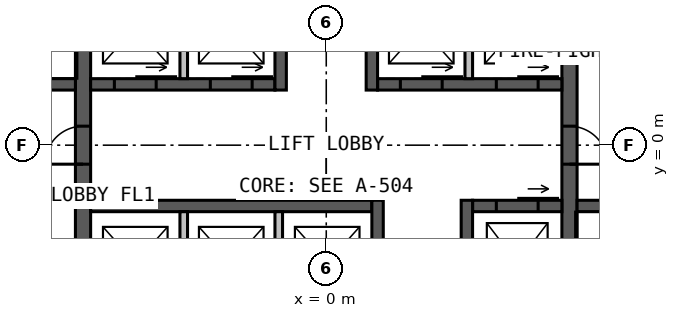
"""IFC4 building model, lengths in metres.
Left out: names, types, materials, properties, quantities, classifications, styles, units other than length and angle.
Written with IfcOpenShell. Run it as: python <this file> out.ifc"""

import sys

from ifc_helpers import new_model, si_unit, direction, frame, frame_2d, origin, place, context, subcontext, project, spatial, rectangle, extrude, element, fill, save


model = new_model("IFC4")
c1 = context("Model", 3, precision=1e-05, world=origin(), true_north=direction((0.0, 1.0)))
c2 = subcontext(c1, "Body", "Model", "MODEL_VIEW")
j1 = project(units=[si_unit("LENGTHUNIT", "METRE"), si_unit("PLANEANGLEUNIT", "RADIAN")], contexts=[c1])
p1 = place(None, origin())
s1 = spatial("IfcSite", under=j1, at=p1, CompositionType="ELEMENT")
p2 = place(p1, origin())
s2 = spatial("IfcBuilding", under=s1, at=p2, CompositionType="ELEMENT")
p3 = place(p2, frame((0.0, 0.0, 146.0)))
s3 = spatial("IfcBuildingStorey", under=s2, at=p3, CompositionType="ELEMENT", Elevation=146.0)
p4 = place(p3, frame((-6.4, -9.45, 0.0), z_axis=(0.0, 0.0, 1.0), x_axis=(0.0, 1.0, 0.0)))
e1 = element("IfcWall", 1, at=p4, inside=s3, PredefinedType="SOLIDWALL", context=c2, shape_type="SweptSolid", body=[
    extrude(rectangle(XDim=18.9, YDim=0.4, at=frame_2d((9.45, 0.0))), origin(), (0.0, 0.0, 1.0), 4.0),
])
p5 = place(p4, frame((8.95, 0.0, 0.0)))
e2 = element("IfcOpeningElement", 2, at=p5, cuts=e1, PredefinedType="OPENING", context=c2, shape_type="SweptSolid", body=[
    extrude(rectangle(XDim=1.0, YDim=2.2, at=frame_2d((0.5, 1.1))), frame((0.0, 0.21, 0.0), z_axis=(0.0, -1.0, 0.0), x_axis=(1.0, 0.0, 0.0)), (0.0, 0.0, 1.0), 0.42),
])
p6 = place(p3, frame((6.4, 9.45, 0.0), z_axis=(0.0, 0.0, 1.0), x_axis=(0.0, -1.0, 0.0)))
e3 = element("IfcWall", 3, at=p6, inside=s3, PredefinedType="SOLIDWALL", context=c2, shape_type="SweptSolid", body=[
    extrude(rectangle(XDim=18.9, YDim=0.4, at=frame_2d((9.45, 0.0))), origin(), (0.0, 0.0, 1.0), 4.0),
])
p7 = place(p6, frame((8.95, 0.0, 0.0)))
e4 = element("IfcOpeningElement", 4, at=p7, cuts=e3, PredefinedType="OPENING", context=c2, shape_type="SweptSolid", body=[
    extrude(rectangle(XDim=1.0, YDim=2.2, at=frame_2d((0.5, 1.1))), frame((0.0, 0.21, 0.0), z_axis=(0.0, -1.0, 0.0), x_axis=(1.0, 0.0, 0.0)), (0.0, 0.0, 1.0), 0.42),
])
p8 = place(p3, frame((-6.2, 1.6, 0.0), z_axis=(0.0, 0.0, 1.0), x_axis=(1.0, 0.0, 0.0)))
e5 = element("IfcWall", 5, at=p8, inside=s3, PredefinedType="SOLIDWALL", context=c2, shape_type="SweptSolid", body=[
    extrude(rectangle(XDim=4.85, YDim=0.3, at=frame_2d((2.425, 0.0))), origin(), (0.0, 0.0, 1.0), 4.0),
])
p9 = place(p8, frame((0.625, 0.0, 0.0)))
e6 = element("IfcOpeningElement", 6, at=p9, cuts=e5, PredefinedType="OPENING", context=c2, shape_type="SweptSolid", body=[
    extrude(rectangle(XDim=1.1, YDim=2.2, at=frame_2d((0.55, 1.1))), frame((0.0, 0.16, 0.0), z_axis=(0.0, -1.0, 0.0), x_axis=(1.0, 0.0, 0.0)), (0.0, 0.0, 1.0), 0.32),
])
p10 = place(p8, frame((3.15, 0.0, 0.0)))
e7 = element("IfcOpeningElement", 7, at=p10, cuts=e5, PredefinedType="OPENING", context=c2, shape_type="SweptSolid", body=[
    extrude(rectangle(XDim=1.1, YDim=2.2, at=frame_2d((0.55, 1.1))), frame((0.0, 0.16, 0.0), z_axis=(0.0, -1.0, 0.0), x_axis=(1.0, 0.0, 0.0)), (0.0, 0.0, 1.0), 0.32),
])
p11 = place(p3, frame((1.35, 1.6, 0.0), z_axis=(0.0, 0.0, 1.0), x_axis=(1.0, 0.0, 0.0)))
e8 = element("IfcWall", 8, at=p11, inside=s3, PredefinedType="SOLIDWALL", context=c2, shape_type="SweptSolid", body=[
    extrude(rectangle(XDim=4.85, YDim=0.3, at=frame_2d((2.425, 0.0))), origin(), (0.0, 0.0, 1.0), 4.0),
])
p12 = place(p11, frame((0.6, 0.0, 0.0)))
e9 = element("IfcOpeningElement", 9, at=p12, cuts=e8, PredefinedType="OPENING", context=c2, shape_type="SweptSolid", body=[
    extrude(rectangle(XDim=1.1, YDim=2.2, at=frame_2d((0.55, 1.1))), frame((0.0, 0.16, 0.0), z_axis=(0.0, -1.0, 0.0), x_axis=(1.0, 0.0, 0.0)), (0.0, 0.0, 1.0), 0.32),
])
p13 = place(p11, frame((3.125, 0.0, 0.0)))
e10 = element("IfcOpeningElement", 10, at=p13, cuts=e8, PredefinedType="OPENING", context=c2, shape_type="SweptSolid", body=[
    extrude(rectangle(XDim=1.1, YDim=2.2, at=frame_2d((0.55, 1.1))), frame((0.0, 0.16, 0.0), z_axis=(0.0, -1.0, 0.0), x_axis=(1.0, 0.0, 0.0)), (0.0, 0.0, 1.0), 0.32),
])
p14 = place(p3, frame((-1.2, 1.45, 0.0), z_axis=(0.0, 0.0, 1.0), x_axis=(0.0, 1.0, 0.0)))
e11 = element("IfcWall", 11, at=p14, inside=s3, PredefinedType="SOLIDWALL", context=c2, shape_type="SweptSolid", body=[
    extrude(rectangle(XDim=8.0, YDim=0.3, at=frame_2d((4.0, 0.0))), origin(), (0.0, 0.0, 1.0), 4.0),
])
p15 = place(p14, frame((5.05, 0.0, 0.0)))
e12 = element("IfcOpeningElement", 12, at=p15, cuts=e11, PredefinedType="OPENING", context=c2, shape_type="SweptSolid", body=[
    extrude(rectangle(XDim=1.0, YDim=2.2, at=frame_2d((0.5, 1.1))), frame((0.0, 0.16, 0.0), z_axis=(0.0, -1.0, 0.0), x_axis=(1.0, 0.0, 0.0)), (0.0, 0.0, 1.0), 0.32),
])
p16 = place(p3, frame((1.2, 1.45, 0.0), z_axis=(0.0, 0.0, 1.0), x_axis=(0.0, 1.0, 0.0)))
e13 = element("IfcWall", 13, at=p16, inside=s3, PredefinedType="SOLIDWALL", context=c2, shape_type="SweptSolid", body=[
    extrude(rectangle(XDim=8.0, YDim=0.3, at=frame_2d((4.0, 0.0))), origin(), (0.0, 0.0, 1.0), 4.0),
])
p17 = place(p16, frame((3.8, 0.0, 0.0)))
e14 = element("IfcOpeningElement", 14, at=p17, cuts=e13, PredefinedType="OPENING", context=c2, shape_type="SweptSolid", body=[
    extrude(rectangle(XDim=1.0, YDim=2.2, at=frame_2d((0.5, 1.1))), frame((0.0, 0.16, 0.0), z_axis=(0.0, -1.0, 0.0), x_axis=(1.0, 0.0, 0.0)), (0.0, 0.0, 1.0), 0.32),
])
p18 = place(p16, frame((6.15, 0.0, 0.0)))
e15 = element("IfcOpeningElement", 15, at=p18, cuts=e13, PredefinedType="OPENING", context=c2, shape_type="SweptSolid", body=[
    extrude(rectangle(XDim=1.0, YDim=2.2, at=frame_2d((0.5, 1.1))), frame((0.0, 0.16, 0.0), z_axis=(0.0, -1.0, 0.0), x_axis=(1.0, 0.0, 0.0)), (0.0, 0.0, 1.0), 0.32),
])
p19 = place(p3, frame((-6.2, -1.6, 0.0), z_axis=(0.0, 0.0, 1.0), x_axis=(1.0, 0.0, 0.0)))
e16 = element("IfcWall", 16, at=p19, inside=s3, PredefinedType="SOLIDWALL", context=c2, shape_type="SweptSolid", body=[
    extrude(rectangle(XDim=7.4, YDim=0.3, at=frame_2d((3.7, 0.0))), origin(), (0.0, 0.0, 1.0), 4.0),
])
p20 = place(p3, frame((3.85, -1.6, 0.0), z_axis=(0.0, 0.0, 1.0), x_axis=(1.0, 0.0, 0.0)))
e17 = element("IfcWall", 17, at=p20, inside=s3, PredefinedType="SOLIDWALL", context=c2, shape_type="SweptSolid", body=[
    extrude(rectangle(XDim=2.35, YDim=0.3, at=frame_2d((1.175, 0.0))), origin(), (0.0, 0.0, 1.0), 4.0),
])
p21 = place(p20, frame((0.625, 0.0, 0.0)))
e18 = element("IfcOpeningElement", 18, at=p21, cuts=e17, PredefinedType="OPENING", context=c2, shape_type="SweptSolid", body=[
    extrude(rectangle(XDim=1.1, YDim=2.2, at=frame_2d((0.55, 1.1))), frame((0.0, 0.16, 0.0), z_axis=(0.0, -1.0, 0.0), x_axis=(1.0, 0.0, 0.0)), (0.0, 0.0, 1.0), 0.32),
])
p22 = place(p3, frame((1.35, -1.45, 0.0), z_axis=(0.0, 0.0, 1.0), x_axis=(0.0, -1.0, 0.0)))
e19 = element("IfcWall", 19, at=p22, inside=s3, PredefinedType="SOLIDWALL", context=c2, shape_type="SweptSolid", body=[
    extrude(rectangle(XDim=8.0, YDim=0.3, at=frame_2d((4.0, 0.0))), origin(), (0.0, 0.0, 1.0), 4.0),
])
p23 = place(p22, frame((5.925, 0.0, 0.0)))
e20 = element("IfcOpeningElement", 20, at=p23, cuts=e19, PredefinedType="OPENING", context=c2, shape_type="SweptSolid", body=[
    extrude(rectangle(XDim=1.0, YDim=2.2, at=frame_2d((0.5, 1.1))), frame((0.0, 0.16, 0.0), z_axis=(0.0, -1.0, 0.0), x_axis=(1.0, 0.0, 0.0)), (0.0, 0.0, 1.0), 0.32),
])
p24 = place(p22, frame((3.525, 0.0, 0.0)))
e21 = element("IfcOpeningElement", 21, at=p24, cuts=e19, PredefinedType="OPENING", context=c2, shape_type="SweptSolid", body=[
    extrude(rectangle(XDim=0.9, YDim=2.2, at=frame_2d((0.45, 1.1))), frame((0.0, 0.16, 0.0), z_axis=(0.0, -1.0, 0.0), x_axis=(1.0, 0.0, 0.0)), (0.0, 0.0, 1.0), 0.32),
])
p25 = place(p3, frame((3.7, -1.45, 0.0), z_axis=(0.0, 0.0, 1.0), x_axis=(0.0, -1.0, 0.0)))
e22 = element("IfcWall", 22, at=p25, inside=s3, PredefinedType="SOLIDWALL", context=c2, shape_type="SweptSolid", body=[
    extrude(rectangle(XDim=8.0, YDim=0.3, at=frame_2d((4.0, 0.0))), origin(), (0.0, 0.0, 1.0), 4.0),
])
p26 = place(p25, frame((5.1, 0.0, 0.0)))
e23 = element("IfcOpeningElement", 23, at=p26, cuts=e22, PredefinedType="OPENING", context=c2, shape_type="SweptSolid", body=[
    extrude(rectangle(XDim=0.9, YDim=2.2, at=frame_2d((0.45, 1.1))), frame((0.0, 0.16, 0.0), z_axis=(0.0, -1.0, 0.0), x_axis=(1.0, 0.0, 0.0)), (0.0, 0.0, 1.0), 0.32),
])
p27 = place(p3, frame((-9.45, 1.6, 0.0), z_axis=(0.0, 0.0, 1.0), x_axis=(1.0, 0.0, 0.0)))
e24 = element("IfcWall", 24, at=p27, inside=s3, PredefinedType="SOLIDWALL", context=c2, shape_type="SweptSolid", body=[
    extrude(rectangle(XDim=2.85, YDim=0.3, at=frame_2d((1.425, 0.0))), origin(), (0.0, 0.0, 1.0), 4.0),
])
p28 = place(p27, frame((0.925, 0.0, 0.0)))
e25 = element("IfcOpeningElement", 25, at=p28, cuts=e24, PredefinedType="OPENING", context=c2, shape_type="SweptSolid", body=[
    extrude(rectangle(XDim=1.0, YDim=2.2, at=frame_2d((0.5, 1.1))), frame((0.0, 0.16, 0.0), z_axis=(0.0, -1.0, 0.0), x_axis=(1.0, 0.0, 0.0)), (0.0, 0.0, 1.0), 0.32),
])
p29 = place(p3, frame((6.6, -1.6, 0.0), z_axis=(0.0, 0.0, 1.0), x_axis=(1.0, 0.0, 0.0)))
e26 = element("IfcWall", 26, at=p29, inside=s3, PredefinedType="SOLIDWALL", context=c2, shape_type="SweptSolid", body=[
    extrude(rectangle(XDim=2.85, YDim=0.3, at=frame_2d((1.425, 0.0))), origin(), (0.0, 0.0, 1.0), 4.0),
])
p30 = place(p29, frame((0.925, 0.0, 0.0)))
e27 = element("IfcOpeningElement", 27, at=p30, cuts=e26, PredefinedType="OPENING", context=c2, shape_type="SweptSolid", body=[
    extrude(rectangle(XDim=1.0, YDim=2.2, at=frame_2d((0.5, 1.1))), frame((0.0, 0.16, 0.0), z_axis=(0.0, -1.0, 0.0), x_axis=(1.0, 0.0, 0.0)), (0.0, 0.0, 1.0), 0.32),
])
for number, where, z_axis, x_axis in (
    (28, (-3.75, 1.75, 0.0), (0.0, 0.0, 1.0), (0.0, 1.0, 0.0)),
    (29, (3.75, 1.75, 0.0), (0.0, 0.0, 1.0), (0.0, 1.0, 0.0)),
    (30, (-3.75, -1.75, 0.0), (0.0, 0.0, 1.0), (0.0, -1.0, 0.0)),
    (31, (-1.25, -1.75, 0.0), (0.0, 0.0, 1.0), (0.0, -1.0, 0.0)),
):
    element("IfcWall", number, at=place(p3, frame(where, z_axis=z_axis, x_axis=x_axis)), inside=s3, PredefinedType="SOLIDWALL", context=c2, shape_type="SweptSolid", body=[
        extrude(rectangle(XDim=2.7, YDim=0.2, at=frame_2d((1.35, 0.0))), origin(), (0.0, 0.0, 1.0), 3.75),
    ])
p31 = place(p5, origin())
e32 = element("IfcDoor", 32, at=p31, inside=s3, OperationType="SINGLE_SWING_LEFT", PredefinedType="DOOR", context=c2, shape_type="SweptSolid", body=[
    extrude(rectangle(XDim=1.0, YDim=2.2, at=frame_2d((0.5, 1.1))), frame((0.0, 0.025, 0.0), z_axis=(0.0, -1.0, 0.0), x_axis=(1.0, 0.0, 0.0)), (0.0, 0.0, 1.0), 0.05),
])
fill(e2, e32)
p32 = place(p7, origin())
e33 = element("IfcDoor", 33, at=p32, inside=s3, OperationType="SINGLE_SWING_RIGHT", PredefinedType="DOOR", context=c2, shape_type="SweptSolid", body=[
    extrude(rectangle(XDim=1.0, YDim=2.2, at=frame_2d((0.5, 1.1))), frame((0.0, 0.025, 0.0), z_axis=(0.0, -1.0, 0.0), x_axis=(1.0, 0.0, 0.0)), (0.0, 0.0, 1.0), 0.05),
])
fill(e4, e33)
p33 = place(p9, origin())
e34 = element("IfcDoor", 34, at=p33, inside=s3, OperationType="SLIDING_TO_LEFT", PredefinedType="DOOR", context=c2, shape_type="SweptSolid", body=[
    extrude(rectangle(XDim=1.1, YDim=2.2, at=frame_2d((0.55, 1.1))), frame((0.0, 0.025, 0.0), z_axis=(0.0, -1.0, 0.0), x_axis=(1.0, 0.0, 0.0)), (0.0, 0.0, 1.0), 0.05),
])
fill(e6, e34)
p34 = place(p10, origin())
e35 = element("IfcDoor", 35, at=p34, inside=s3, OperationType="SLIDING_TO_LEFT", PredefinedType="DOOR", context=c2, shape_type="SweptSolid", body=[
    extrude(rectangle(XDim=1.1, YDim=2.2, at=frame_2d((0.55, 1.1))), frame((0.0, 0.025, 0.0), z_axis=(0.0, -1.0, 0.0), x_axis=(1.0, 0.0, 0.0)), (0.0, 0.0, 1.0), 0.05),
])
fill(e7, e35)
p35 = place(p12, origin())
e36 = element("IfcDoor", 36, at=p35, inside=s3, OperationType="SLIDING_TO_LEFT", PredefinedType="DOOR", context=c2, shape_type="SweptSolid", body=[
    extrude(rectangle(XDim=1.1, YDim=2.2, at=frame_2d((0.55, 1.1))), frame((0.0, 0.025, 0.0), z_axis=(0.0, -1.0, 0.0), x_axis=(1.0, 0.0, 0.0)), (0.0, 0.0, 1.0), 0.05),
])
fill(e9, e36)
p36 = place(p13, origin())
e37 = element("IfcDoor", 37, at=p36, inside=s3, OperationType="SLIDING_TO_LEFT", PredefinedType="DOOR", context=c2, shape_type="SweptSolid", body=[
    extrude(rectangle(XDim=1.1, YDim=2.2, at=frame_2d((0.55, 1.1))), frame((0.0, 0.025, 0.0), z_axis=(0.0, -1.0, 0.0), x_axis=(1.0, 0.0, 0.0)), (0.0, 0.0, 1.0), 0.05),
])
fill(e10, e37)
p37 = place(p21, origin())
e38 = element("IfcDoor", 38, at=p37, inside=s3, OperationType="SLIDING_TO_LEFT", PredefinedType="DOOR", context=c2, shape_type="SweptSolid", body=[
    extrude(rectangle(XDim=1.1, YDim=2.2, at=frame_2d((0.55, 1.1))), frame((0.0, 0.025, 0.0), z_axis=(0.0, -1.0, 0.0), x_axis=(1.0, 0.0, 0.0)), (0.0, 0.0, 1.0), 0.05),
])
fill(e18, e38)
save(model, sys.argv[1])
